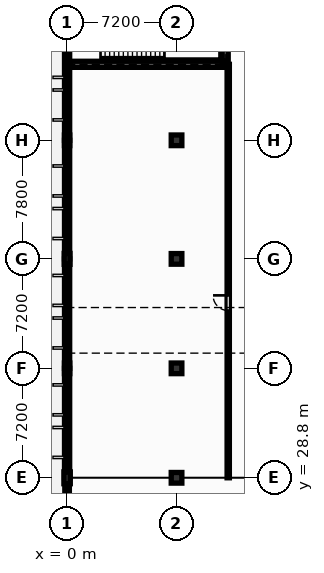
"""IFC4 building model, lengths in metres.
Left out: names, types, materials, properties, quantities, classifications, styles, units other than length and angle.
Written with IfcOpenShell. Run it as: python <this file> out.ifc"""

import sys

from ifc_helpers import new_model, si_unit, direction, frame, frame_2d, origin, origin_2d, place, context, subcontext, project, spatial, rectangle, extrude, element, fill, save


model = new_model("IFC4")
c1 = context("Model", 3, precision=1e-05, world=origin(), true_north=direction((0.0, 1.0)))
c2 = subcontext(c1, "Body", "Model", "MODEL_VIEW")
j1 = project(units=[si_unit("LENGTHUNIT", "METRE"), si_unit("PLANEANGLEUNIT", "RADIAN")], contexts=[c1])
p1 = place(None, origin())
s1 = spatial("IfcSite", under=j1, at=p1, CompositionType="ELEMENT")
p2 = place(p1, origin())
s2 = spatial("IfcBuilding", under=s1, at=p2, CompositionType="ELEMENT")
p3 = place(p2, origin())
s3 = spatial("IfcBuildingStorey", under=s2, at=p3, CompositionType="ELEMENT", Elevation=0.0)
p4 = place(p3, frame((0.0, 28.8, 0.0), z_axis=(0.0, 0.0, 1.0), x_axis=(1.0, 0.0, 0.0)))
e1 = element("IfcColumn", 1, at=p4, inside=s3, PredefinedType="PILASTER", context=c2, shape_type="SweptSolid", body=[
    extrude(rectangle(XDim=0.42, YDim=0.78, at=origin_2d()), origin(), (0.0, 0.0, 1.0), 5.1),
])
p5 = place(p3, frame((0.0, 36.0, 0.0), z_axis=(0.0, 0.0, 1.0), x_axis=(1.0, 0.0, 0.0)))
e2 = element("IfcColumn", 2, at=p5, inside=s3, PredefinedType="PILASTER", context=c2, shape_type="SweptSolid", body=[
    extrude(rectangle(XDim=0.35, YDim=0.7, at=origin_2d()), origin(), (0.0, 0.0, 1.0), 5.1),
])
p6 = place(p3, frame((0.0, 43.2, 0.0), z_axis=(0.0, 0.0, 1.0), x_axis=(1.0, 0.0, 0.0)))
e3 = element("IfcColumn", 3, at=p6, inside=s3, PredefinedType="PILASTER", context=c2, shape_type="SweptSolid", body=[
    extrude(rectangle(XDim=0.38, YDim=0.72, at=origin_2d()), origin(), (0.0, 0.0, 1.0), 5.1),
])
p7 = place(p3, frame((0.0, 51.0, 0.0), z_axis=(0.0, 0.0, 1.0), x_axis=(1.0, 0.0, 0.0)))
e4 = element("IfcColumn", 4, at=p7, inside=s3, PredefinedType="PILASTER", context=c2, shape_type="SweptSolid", body=[
    extrude(rectangle(XDim=0.35, YDim=0.7, at=origin_2d()), origin(), (0.0, 0.0, 1.0), 5.1),
])
for number, where, z_axis, x_axis in (
    (5, (7.2, 28.8, 0.0), (0.0, 0.0, 1.0), (1.0, 0.0, 0.0)),
    (6, (7.2, 36.0, 0.0), (0.0, 0.0, 1.0), (1.0, 0.0, 0.0)),
    (7, (7.2, 43.2, 0.0), (0.0, 0.0, 1.0), (1.0, 0.0, 0.0)),
    (8, (7.2, 51.0, 0.0), (0.0, 0.0, 1.0), (1.0, 0.0, 0.0)),
):
    element("IfcColumn", number, at=place(p3, frame(where, z_axis=z_axis, x_axis=x_axis)), inside=s3, PredefinedType="COLUMN", context=c2, shape_type="SweptSolid", body=[
        extrude(rectangle(XDim=0.7, YDim=0.7, at=origin_2d()), origin(), (0.0, 0.0, 1.0), 5.1),
    ])
p8 = place(p3, frame((0.0, 28.8, 0.0), z_axis=(0.0, 0.0, 1.0), x_axis=(0.0, 1.0, 0.0)))
e9 = element("IfcWall", 9, at=p8, inside=s3, PredefinedType="SOLIDWALL", context=c2, shape_type="SweptSolid", body=[
    extrude(rectangle(XDim=7.2, YDim=0.34, at=frame_2d((3.6, 0.0))), origin(), (0.0, 0.0, 1.0), 4.8),
])
p9 = place(p8, frame((1.5, 0.0, 0.85)))
e10 = element("IfcOpeningElement", 10, at=p9, cuts=e9, PredefinedType="OPENING", context=c2, shape_type="SweptSolid", body=[
    extrude(rectangle(XDim=1.65, YDim=2.25, at=frame_2d((0.825, 1.125))), frame((0.0, 0.18, 0.0), z_axis=(0.0, -1.0, 0.0), x_axis=(1.0, 0.0, 0.0)), (0.0, 0.0, 1.0), 0.36),
])
p10 = place(p8, frame((4.3, 0.0, 0.85)))
e11 = element("IfcOpeningElement", 11, at=p10, cuts=e9, PredefinedType="OPENING", context=c2, shape_type="SweptSolid", body=[
    extrude(rectangle(XDim=1.65, YDim=2.25, at=frame_2d((0.825, 1.125))), frame((0.0, 0.18, 0.0), z_axis=(0.0, -1.0, 0.0), x_axis=(1.0, 0.0, 0.0)), (0.0, 0.0, 1.0), 0.36),
])
p11 = place(p3, frame((0.0, 36.0, 0.0), z_axis=(0.0, 0.0, 1.0), x_axis=(0.0, 1.0, 0.0)))
e12 = element("IfcWall", 12, at=p11, inside=s3, PredefinedType="SOLIDWALL", context=c2, shape_type="SweptSolid", body=[
    extrude(rectangle(XDim=7.2, YDim=0.34, at=frame_2d((3.6, 0.0))), origin(), (0.0, 0.0, 1.0), 4.8),
])
p12 = place(p11, frame((1.5, 0.0, 0.85)))
e13 = element("IfcOpeningElement", 13, at=p12, cuts=e12, PredefinedType="OPENING", context=c2, shape_type="SweptSolid", body=[
    extrude(rectangle(XDim=1.65, YDim=2.25, at=frame_2d((0.825, 1.125))), frame((0.0, 0.18, 0.0), z_axis=(0.0, -1.0, 0.0), x_axis=(1.0, 0.0, 0.0)), (0.0, 0.0, 1.0), 0.36),
])
p13 = place(p11, frame((4.3, 0.0, 0.85)))
e14 = element("IfcOpeningElement", 14, at=p13, cuts=e12, PredefinedType="OPENING", context=c2, shape_type="SweptSolid", body=[
    extrude(rectangle(XDim=1.65, YDim=2.25, at=frame_2d((0.825, 1.125))), frame((0.0, 0.18, 0.0), z_axis=(0.0, -1.0, 0.0), x_axis=(1.0, 0.0, 0.0)), (0.0, 0.0, 1.0), 0.36),
])
p14 = place(p3, frame((0.0, 43.2, 0.0), z_axis=(0.0, 0.0, 1.0), x_axis=(0.0, 1.0, 0.0)))
e15 = element("IfcWall", 15, at=p14, inside=s3, PredefinedType="SOLIDWALL", context=c2, shape_type="SweptSolid", body=[
    extrude(rectangle(XDim=7.8, YDim=0.34, at=frame_2d((3.9, 0.0))), origin(), (0.0, 0.0, 1.0), 4.8),
])
p15 = place(p14, frame((1.5, 0.0, 0.85)))
e16 = element("IfcOpeningElement", 16, at=p15, cuts=e15, PredefinedType="OPENING", context=c2, shape_type="SweptSolid", body=[
    extrude(rectangle(XDim=1.65, YDim=2.25, at=frame_2d((0.825, 1.125))), frame((0.0, 0.18, 0.0), z_axis=(0.0, -1.0, 0.0), x_axis=(1.0, 0.0, 0.0)), (0.0, 0.0, 1.0), 0.36),
])
p16 = place(p14, frame((4.3, 0.0, 0.85)))
e17 = element("IfcOpeningElement", 17, at=p16, cuts=e15, PredefinedType="OPENING", context=c2, shape_type="SweptSolid", body=[
    extrude(rectangle(XDim=1.65, YDim=2.25, at=frame_2d((0.825, 1.125))), frame((0.0, 0.18, 0.0), z_axis=(0.0, -1.0, 0.0), x_axis=(1.0, 0.0, 0.0)), (0.0, 0.0, 1.0), 0.36),
])
p17 = place(p3, frame((0.0, 51.0, 0.0), z_axis=(0.0, 0.0, 1.0), x_axis=(0.0, 1.0, 0.0)))
e18 = element("IfcWall", 18, at=p17, inside=s3, PredefinedType="SOLIDWALL", context=c2, shape_type="SweptSolid", body=[
    extrude(rectangle(XDim=7.8, YDim=0.34, at=frame_2d((3.9, 0.0))), origin(), (0.0, 0.0, 1.0), 4.8),
])
p18 = place(p17, frame((1.5, 0.0, 0.85)))
e19 = element("IfcOpeningElement", 19, at=p18, cuts=e18, PredefinedType="OPENING", context=c2, shape_type="SweptSolid", body=[
    extrude(rectangle(XDim=1.65, YDim=2.25, at=frame_2d((0.825, 1.125))), frame((0.0, 0.18, 0.0), z_axis=(0.0, -1.0, 0.0), x_axis=(1.0, 0.0, 0.0)), (0.0, 0.0, 1.0), 0.36),
])
p19 = place(p3, frame((0.0, 21.6, 0.0), z_axis=(0.0, 0.0, 1.0), x_axis=(0.0, 1.0, 0.0)))
e20 = element("IfcWall", 20, at=p19, inside=s3, PredefinedType="SOLIDWALL", context=c2, shape_type="SweptSolid", body=[
    extrude(rectangle(XDim=7.2, YDim=0.3, at=frame_2d((3.6, 0.0))), origin(), (0.0, 0.0, 1.0), 4.115),
])
p20 = place(p19, frame((2.0, 0.0, 0.9)))
e21 = element("IfcOpeningElement", 21, at=p20, cuts=e20, PredefinedType="OPENING", context=c2, shape_type="SweptSolid", body=[
    extrude(rectangle(XDim=2.4, YDim=2.4, at=frame_2d((1.2, 1.2))), frame((0.0, 0.16, 0.0), z_axis=(0.0, -1.0, 0.0), x_axis=(1.0, 0.0, 0.0)), (0.0, 0.0, 1.0), 0.32),
])
p21 = place(p3, frame((0.17, 56.0, 0.0), z_axis=(0.0, 0.0, 1.0), x_axis=(1.0, 0.0, 0.0)))
e22 = element("IfcWall", 22, at=p21, inside=s3, PredefinedType="SHEAR", context=c2, shape_type="SweptSolid", body=[
    extrude(rectangle(XDim=10.23, YDim=0.4, at=frame_2d((5.115, 0.0))), origin(), (0.0, 0.0, 1.0), 4.8),
])
p22 = place(p3, frame((10.4, 56.2, 0.0), z_axis=(0.0, 0.0, 1.0), x_axis=(0.0, 1.0, 0.0)))
e23 = element("IfcWall", 23, at=p22, inside=s3, PredefinedType="SHEAR", context=c2, shape_type="SweptSolid", body=[
    extrude(rectangle(XDim=9.8, YDim=0.4, at=frame_2d((4.9, 0.0))), origin(), (0.0, 0.0, 1.0), 4.8),
])
p23 = place(p22, frame((6.8, 0.0, 0.0)))
e24 = element("IfcOpeningElement", 24, at=p23, cuts=e23, PredefinedType="OPENING", context=c2, shape_type="SweptSolid", body=[
    extrude(rectangle(XDim=1.5, YDim=2.2, at=frame_2d((0.75, 1.1))), frame((0.0, 0.21, 0.0), z_axis=(0.0, -1.0, 0.0), x_axis=(1.0, 0.0, 0.0)), (0.0, 0.0, 1.0), 0.42),
])
p24 = place(p3, frame((10.6, 28.8, 0.0), z_axis=(0.0, 0.0, 1.0), x_axis=(0.0, 1.0, 0.0)))
e25 = element("IfcWall", 25, at=p24, inside=s3, PredefinedType="PARTITIONING", context=c2, shape_type="SweptSolid", body=[
    extrude(rectangle(XDim=27.2, YDim=0.15, at=frame_2d((13.6, 0.0))), origin(), (0.0, 0.0, 1.0), 4.459),
])
p25 = place(p24, frame((11.0, 0.0, 0.0)))
e26 = element("IfcOpeningElement", 26, at=p25, cuts=e25, PredefinedType="OPENING", context=c2, shape_type="SweptSolid", body=[
    extrude(rectangle(XDim=1.0, YDim=2.15, at=frame_2d((0.5, 1.075))), frame((0.0, 0.085, 0.0), z_axis=(0.0, -1.0, 0.0), x_axis=(1.0, 0.0, 0.0)), (0.0, 0.0, 1.0), 0.17),
])
p26 = place(p9, origin())
e27 = element("IfcWindow", 27, at=p26, inside=s3, PartitioningType="SINGLE_PANEL", PredefinedType="WINDOW", context=c2, shape_type="SweptSolid", body=[
    extrude(rectangle(XDim=1.65, YDim=2.25, at=frame_2d((0.825, 1.125))), frame((0.0, 0.03, 0.0), z_axis=(0.0, -1.0, 0.0), x_axis=(1.0, 0.0, 0.0)), (0.0, 0.0, 1.0), 0.06),
])
fill(e10, e27)
p27 = place(p10, origin())
e28 = element("IfcWindow", 28, at=p27, inside=s3, PartitioningType="SINGLE_PANEL", PredefinedType="WINDOW", context=c2, shape_type="SweptSolid", body=[
    extrude(rectangle(XDim=1.65, YDim=2.25, at=frame_2d((0.825, 1.125))), frame((0.0, 0.03, 0.0), z_axis=(0.0, -1.0, 0.0), x_axis=(1.0, 0.0, 0.0)), (0.0, 0.0, 1.0), 0.06),
])
fill(e11, e28)
p28 = place(p12, origin())
e29 = element("IfcWindow", 29, at=p28, inside=s3, PartitioningType="SINGLE_PANEL", PredefinedType="WINDOW", context=c2, shape_type="SweptSolid", body=[
    extrude(rectangle(XDim=1.65, YDim=2.25, at=frame_2d((0.825, 1.125))), frame((0.0, 0.03, 0.0), z_axis=(0.0, -1.0, 0.0), x_axis=(1.0, 0.0, 0.0)), (0.0, 0.0, 1.0), 0.06),
])
fill(e13, e29)
p29 = place(p13, origin())
e30 = element("IfcWindow", 30, at=p29, inside=s3, PartitioningType="SINGLE_PANEL", PredefinedType="WINDOW", context=c2, shape_type="SweptSolid", body=[
    extrude(rectangle(XDim=1.65, YDim=2.25, at=frame_2d((0.825, 1.125))), frame((0.0, 0.03, 0.0), z_axis=(0.0, -1.0, 0.0), x_axis=(1.0, 0.0, 0.0)), (0.0, 0.0, 1.0), 0.06),
])
fill(e14, e30)
p30 = place(p15, origin())
e31 = element("IfcWindow", 31, at=p30, inside=s3, PartitioningType="SINGLE_PANEL", PredefinedType="WINDOW", context=c2, shape_type="SweptSolid", body=[
    extrude(rectangle(XDim=1.65, YDim=2.25, at=frame_2d((0.825, 1.125))), frame((0.0, 0.03, 0.0), z_axis=(0.0, -1.0, 0.0), x_axis=(1.0, 0.0, 0.0)), (0.0, 0.0, 1.0), 0.06),
])
fill(e16, e31)
p31 = place(p16, origin())
e32 = element("IfcWindow", 32, at=p31, inside=s3, PartitioningType="SINGLE_PANEL", PredefinedType="WINDOW", context=c2, shape_type="SweptSolid", body=[
    extrude(rectangle(XDim=1.65, YDim=2.25, at=frame_2d((0.825, 1.125))), frame((0.0, 0.03, 0.0), z_axis=(0.0, -1.0, 0.0), x_axis=(1.0, 0.0, 0.0)), (0.0, 0.0, 1.0), 0.06),
])
fill(e17, e32)
p32 = place(p18, origin())
e33 = element("IfcWindow", 33, at=p32, inside=s3, PartitioningType="SINGLE_PANEL", PredefinedType="WINDOW", context=c2, shape_type="SweptSolid", body=[
    extrude(rectangle(XDim=1.65, YDim=2.25, at=frame_2d((0.825, 1.125))), frame((0.0, 0.03, 0.0), z_axis=(0.0, -1.0, 0.0), x_axis=(1.0, 0.0, 0.0)), (0.0, 0.0, 1.0), 0.06),
])
fill(e19, e33)
p33 = place(p25, origin())
e34 = element("IfcDoor", 34, at=p33, inside=s3, OperationType="SINGLE_SWING_RIGHT", PredefinedType="DOOR", context=c2, shape_type="SweptSolid", body=[
    extrude(rectangle(XDim=1.0, YDim=2.15, at=frame_2d((0.5, 1.075))), frame((0.0, 0.025, 0.0), z_axis=(0.0, -1.0, 0.0), x_axis=(1.0, 0.0, 0.0)), (0.0, 0.0, 1.0), 0.05),
])
fill(e26, e34)
save(model, sys.argv[1])
